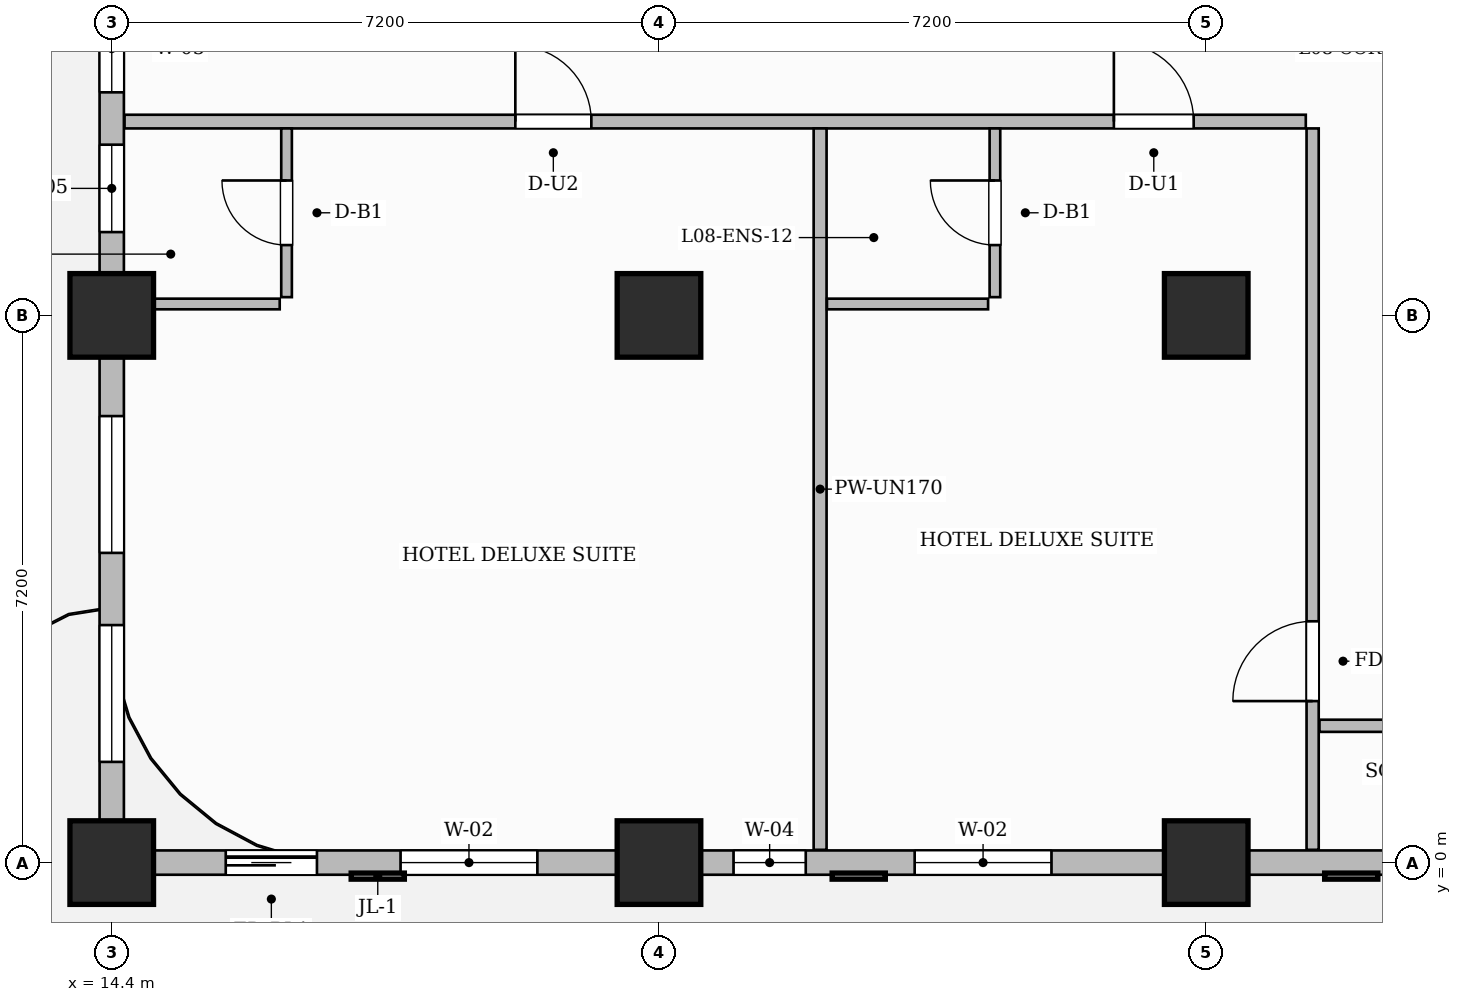
"""IFC4 building model, lengths in metres.
Left out: names, types, materials, properties, quantities, classifications, styles, units other than length and angle.
Written with IfcOpenShell. Run it as: python <this file> out.ifc"""

import sys

from ifc_helpers import new_model, si_unit, direction, frame, frame_2d, origin, origin_2d, place, context, subcontext, project, spatial, rectangle, extrude, source, transform, mapped, element, fill, save


model = new_model("IFC4")
c1 = context("Model", 3, precision=1e-05, world=origin(), true_north=direction((0.0, 1.0)))
c2 = subcontext(c1, "Body", "Model", "MODEL_VIEW")
j1 = project(units=[si_unit("LENGTHUNIT", "METRE"), si_unit("PLANEANGLEUNIT", "RADIAN")], contexts=[c1])
p1 = place(None, origin())
s1 = spatial("IfcSite", under=j1, at=p1, CompositionType="ELEMENT")
p2 = place(p1, origin())
s2 = spatial("IfcBuilding", under=s1, at=p2, CompositionType="ELEMENT")
p3 = place(p2, frame((0.0, 0.0, 39.8)))
s3 = spatial("IfcBuildingStorey", under=s2, at=p3, CompositionType="ELEMENT", Elevation=39.8)
m1 = source(origin(), c2, "Body", "SweptSolid", [
    extrude(rectangle(XDim=1.1, YDim=1.1, at=origin_2d()), origin(), (0.0, 0.0, 1.0), 3.7),
])
for number, where, z_axis, x_axis in (
    (1, (14.4, 0.0, 0.0), (0.0, 0.0, 1.0), (1.0, 0.0, 0.0)),
    (2, (14.4, 7.2, 0.0), (0.0, 0.0, 1.0), (1.0, 0.0, 0.0)),
    (3, (21.6, 0.0, 0.0), (0.0, 0.0, 1.0), (1.0, 0.0, 0.0)),
    (4, (21.6, 7.2, 0.0), (0.0, 0.0, 1.0), (1.0, 0.0, 0.0)),
    (5, (28.8, 0.0, 0.0), (0.0, 0.0, 1.0), (1.0, 0.0, 0.0)),
    (6, (28.8, 7.2, 0.0), (0.0, 0.0, 1.0), (1.0, 0.0, 0.0)),
):
    element("IfcColumn", number, at=place(p3, frame(where, z_axis=z_axis, x_axis=x_axis)), inside=s3, PredefinedType="COLUMN", context=c2, shape_type="MappedRepresentation", body=[
        mapped(m1, transform((0.0, 0.0, 0.0), scale=1.0)),
    ])
p4 = place(p3, frame((14.568, 9.75, 0.0), z_axis=(0.0, 0.0, 1.0), x_axis=(1.0, 0.0, 0.0)))
e7 = element("IfcWall", 7, at=p4, inside=s3, PredefinedType="PARTITIONING", context=c2, shape_type="SweptSolid", body=[
    extrude(rectangle(XDim=15.542, YDim=0.18, at=frame_2d((7.771, 0.0))), origin(), (0.0, 0.0, 1.0), 3.45),
])
p5 = place(p4, frame((5.142, 0.0, 0.0)))
e8 = element("IfcOpeningElement", 8, at=p5, cuts=e7, PredefinedType="OPENING", context=c2, shape_type="SweptSolid", body=[
    extrude(rectangle(XDim=1.0, YDim=2.2, at=frame_2d((0.5, 1.1))), frame((0.0, 0.1, 0.0), z_axis=(0.0, -1.0, 0.0), x_axis=(1.0, 0.0, 0.0)), (0.0, 0.0, 1.0), 0.2),
])
p6 = place(p4, frame((13.017, 0.0, 0.0)))
e9 = element("IfcOpeningElement", 9, at=p6, cuts=e7, PredefinedType="OPENING", context=c2, shape_type="SweptSolid", body=[
    extrude(rectangle(XDim=1.05, YDim=2.25, at=frame_2d((0.525, 1.125))), frame((0.0, 0.1, 0.0), z_axis=(0.0, -1.0, 0.0), x_axis=(1.0, 0.0, 0.0)), (0.0, 0.0, 1.0), 0.2),
])
p7 = place(p3, frame((30.2, 0.168, 0.0), z_axis=(0.0, 0.0, 1.0), x_axis=(0.0, 1.0, 0.0)))
e10 = element("IfcWall", 10, at=p7, inside=s3, PredefinedType="PARTITIONING", context=c2, shape_type="SweptSolid", body=[
    extrude(rectangle(XDim=9.492, YDim=0.16, at=frame_2d((4.746, 0.0))), origin(), (0.0, 0.0, 1.0), 3.45),
])
p8 = place(p7, frame((1.957, 0.0, 0.0)))
e11 = element("IfcOpeningElement", 11, at=p8, cuts=e10, PredefinedType="OPENING", context=c2, shape_type="SweptSolid", body=[
    extrude(rectangle(XDim=1.05, YDim=2.15, at=frame_2d((0.525, 1.075))), frame((0.0, 0.09, 0.0), z_axis=(0.0, -1.0, 0.0), x_axis=(1.0, 0.0, 0.0)), (0.0, 0.0, 1.0), 0.18),
])
p9 = place(p3, frame((30.29, 1.8, 0.0), z_axis=(0.0, 0.0, 1.0), x_axis=(1.0, 0.0, 0.0)))
e12 = element("IfcWall", 12, at=p9, inside=s3, PredefinedType="PARTITIONING", context=c2, shape_type="SweptSolid", body=[
    extrude(rectangle(XDim=19.37, YDim=0.16, at=frame_2d((9.685, 0.0))), origin(), (0.0, 0.0, 1.0), 3.45),
])
p10 = place(p9, frame((5.213, 0.0, 0.0)))
e13 = element("IfcOpeningElement", 13, at=p10, cuts=e12, PredefinedType="OPENING", context=c2, shape_type="SweptSolid", body=[
    extrude(rectangle(XDim=0.9, YDim=2.15, at=frame_2d((0.45, 1.075))), frame((0.0, 0.09, 0.0), z_axis=(0.0, -1.0, 0.0), x_axis=(1.0, 0.0, 0.0)), (0.0, 0.0, 1.0), 0.18),
])
p11 = place(p9, frame((14.06, 0.0, 0.0)))
e14 = element("IfcOpeningElement", 14, at=p11, cuts=e12, PredefinedType="OPENING", context=c2, shape_type="SweptSolid", body=[
    extrude(rectangle(XDim=0.9, YDim=2.15, at=frame_2d((0.45, 1.075))), frame((0.0, 0.09, 0.0), z_axis=(0.0, -1.0, 0.0), x_axis=(1.0, 0.0, 0.0)), (0.0, 0.0, 1.0), 0.18),
])
p12 = place(p3, frame((23.72, 0.168, 0.0), z_axis=(0.0, 0.0, 1.0), x_axis=(0.0, 1.0, 0.0)))
e15 = element("IfcWall", 15, at=p12, inside=s3, PredefinedType="PARTITIONING", context=c2, shape_type="SweptSolid", body=[
    extrude(rectangle(XDim=9.492, YDim=0.17, at=frame_2d((4.746, 0.0))), origin(), (0.0, 0.0, 1.0), 3.45),
])
p13 = place(p3, frame((16.7, 7.44, 0.0), z_axis=(0.0, 0.0, 1.0), x_axis=(0.0, 1.0, 0.0)))
e16 = element("IfcWall", 16, at=p13, inside=s3, PredefinedType="PARTITIONING", context=c2, shape_type="SweptSolid", body=[
    extrude(rectangle(XDim=2.22, YDim=0.14, at=frame_2d((1.11, 0.0))), origin(), (0.0, 0.0, 1.0), 3.45),
])
p14 = place(p13, frame((0.685, 0.0, 0.0)))
e17 = element("IfcOpeningElement", 17, at=p14, cuts=e16, PredefinedType="OPENING", context=c2, shape_type="SweptSolid", body=[
    extrude(rectangle(XDim=0.85, YDim=2.1, at=frame_2d((0.425, 1.05))), frame((0.0, 0.08, 0.0), z_axis=(0.0, -1.0, 0.0), x_axis=(1.0, 0.0, 0.0)), (0.0, 0.0, 1.0), 0.16),
])
p15 = place(p3, frame((14.49, 7.35, 0.0), z_axis=(0.0, 0.0, 1.0), x_axis=(1.0, 0.0, 0.0)))
e18 = element("IfcWall", 18, at=p15, inside=s3, PredefinedType="PARTITIONING", context=c2, shape_type="SweptSolid", body=[
    extrude(rectangle(XDim=2.12, YDim=0.14, at=frame_2d((1.06, 0.0))), origin(), (0.0, 0.0, 1.0), 2.885),
])
p16 = place(p3, frame((26.02, 7.44, 0.0), z_axis=(0.0, 0.0, 1.0), x_axis=(0.0, 1.0, 0.0)))
e19 = element("IfcWall", 19, at=p16, inside=s3, PredefinedType="PARTITIONING", context=c2, shape_type="SweptSolid", body=[
    extrude(rectangle(XDim=2.22, YDim=0.14, at=frame_2d((1.11, 0.0))), origin(), (0.0, 0.0, 1.0), 3.45),
])
p17 = place(p16, frame((0.685, 0.0, 0.0)))
e20 = element("IfcOpeningElement", 20, at=p17, cuts=e19, PredefinedType="OPENING", context=c2, shape_type="SweptSolid", body=[
    extrude(rectangle(XDim=0.85, YDim=2.1, at=frame_2d((0.425, 1.05))), frame((0.0, 0.08, 0.0), z_axis=(0.0, -1.0, 0.0), x_axis=(1.0, 0.0, 0.0)), (0.0, 0.0, 1.0), 0.16),
])
p18 = place(p3, frame((23.81, 7.35, 0.0), z_axis=(0.0, 0.0, 1.0), x_axis=(1.0, 0.0, 0.0)))
e21 = element("IfcWall", 21, at=p18, inside=s3, PredefinedType="PARTITIONING", context=c2, shape_type="SweptSolid", body=[
    extrude(rectangle(XDim=2.12, YDim=0.14, at=frame_2d((1.06, 0.0))), origin(), (0.0, 0.0, 1.0), 2.885),
])
p19 = place(p3, frame((14.4, 0.0, 0.0), z_axis=(0.0, 0.0, 1.0), x_axis=(1.0, 0.0, 0.0)))
e22 = element("IfcWall", 22, at=p19, inside=s3, PredefinedType="SOLIDWALL", context=c2, shape_type="SweptSolid", body=[
    extrude(rectangle(XDim=43.2, YDim=0.32, at=frame_2d((21.6, 0.0))), origin(), (0.0, 0.0, 1.0), 2.885),
])
p20 = place(p19, frame((1.5, 0.0, 0.0)))
e23 = element("IfcOpeningElement", 23, at=p20, cuts=e22, PredefinedType="OPENING", context=c2, shape_type="SweptSolid", body=[
    extrude(rectangle(XDim=1.2, YDim=2.2, at=frame_2d((0.6, 1.1))), frame((0.0, 0.17, 0.0), z_axis=(0.0, -1.0, 0.0), x_axis=(1.0, 0.0, 0.0)), (0.0, 0.0, 1.0), 0.34),
])
p21 = place(p19, frame((3.8, 0.0, 0.8)))
e24 = element("IfcOpeningElement", 24, at=p21, cuts=e22, PredefinedType="OPENING", context=c2, shape_type="SweptSolid", body=[
    extrude(rectangle(XDim=1.8, YDim=1.85, at=frame_2d((0.9, 0.925))), frame((0.0, 0.17, 0.0), z_axis=(0.0, -1.0, 0.0), x_axis=(1.0, 0.0, 0.0)), (0.0, 0.0, 1.0), 0.34),
])
p22 = place(p19, frame((8.181, 0.0, 0.8)))
e25 = element("IfcOpeningElement", 25, at=p22, cuts=e22, PredefinedType="OPENING", context=c2, shape_type="SweptSolid", body=[
    extrude(rectangle(XDim=0.95, YDim=1.75, at=frame_2d((0.475, 0.875))), frame((0.0, 0.17, 0.0), z_axis=(0.0, -1.0, 0.0), x_axis=(1.0, 0.0, 0.0)), (0.0, 0.0, 1.0), 0.34),
])
p23 = place(p19, frame((10.564, 0.0, 0.8)))
e26 = element("IfcOpeningElement", 26, at=p23, cuts=e22, PredefinedType="OPENING", context=c2, shape_type="SweptSolid", body=[
    extrude(rectangle(XDim=1.8, YDim=1.85, at=frame_2d((0.9, 0.925))), frame((0.0, 0.17, 0.0), z_axis=(0.0, -1.0, 0.0), x_axis=(1.0, 0.0, 0.0)), (0.0, 0.0, 1.0), 0.34),
])
p24 = place(p19, frame((16.804, 0.0, 0.8)))
e27 = element("IfcOpeningElement", 27, at=p24, cuts=e22, PredefinedType="OPENING", context=c2, shape_type="SweptSolid", body=[
    extrude(rectangle(XDim=1.8, YDim=1.85, at=frame_2d((0.9, 0.925))), frame((0.0, 0.17, 0.0), z_axis=(0.0, -1.0, 0.0), x_axis=(1.0, 0.0, 0.0)), (0.0, 0.0, 1.0), 0.34),
])
p25 = place(p19, frame((22.396, 0.0, 0.8)))
e28 = element("IfcOpeningElement", 28, at=p25, cuts=e22, PredefinedType="OPENING", context=c2, shape_type="SweptSolid", body=[
    extrude(rectangle(XDim=1.8, YDim=1.85, at=frame_2d((0.9, 0.925))), frame((0.0, 0.17, 0.0), z_axis=(0.0, -1.0, 0.0), x_axis=(1.0, 0.0, 0.0)), (0.0, 0.0, 1.0), 0.34),
])
p26 = place(p19, frame((25.629, 0.0, 0.8)))
e29 = element("IfcOpeningElement", 29, at=p26, cuts=e22, PredefinedType="OPENING", context=c2, shape_type="SweptSolid", body=[
    extrude(rectangle(XDim=0.95, YDim=1.75, at=frame_2d((0.475, 0.875))), frame((0.0, 0.17, 0.0), z_axis=(0.0, -1.0, 0.0), x_axis=(1.0, 0.0, 0.0)), (0.0, 0.0, 1.0), 0.34),
])
p27 = place(p19, frame((29.075, 0.0, 0.8)))
e30 = element("IfcOpeningElement", 30, at=p27, cuts=e22, PredefinedType="OPENING", context=c2, shape_type="SweptSolid", body=[
    extrude(rectangle(XDim=1.8, YDim=1.85, at=frame_2d((0.9, 0.925))), frame((0.0, 0.17, 0.0), z_axis=(0.0, -1.0, 0.0), x_axis=(1.0, 0.0, 0.0)), (0.0, 0.0, 1.0), 0.34),
])
p28 = place(p19, frame((32.125, 0.0, 0.8)))
e31 = element("IfcOpeningElement", 31, at=p28, cuts=e22, PredefinedType="OPENING", context=c2, shape_type="SweptSolid", body=[
    extrude(rectangle(XDim=1.8, YDim=1.85, at=frame_2d((0.9, 0.925))), frame((0.0, 0.17, 0.0), z_axis=(0.0, -1.0, 0.0), x_axis=(1.0, 0.0, 0.0)), (0.0, 0.0, 1.0), 0.34),
])
p29 = place(p19, frame((36.946, 0.0, 0.8)))
e32 = element("IfcOpeningElement", 32, at=p29, cuts=e22, PredefinedType="OPENING", context=c2, shape_type="SweptSolid", body=[
    extrude(rectangle(XDim=1.8, YDim=1.85, at=frame_2d((0.9, 0.925))), frame((0.0, 0.17, 0.0), z_axis=(0.0, -1.0, 0.0), x_axis=(1.0, 0.0, 0.0)), (0.0, 0.0, 1.0), 0.34),
])
p30 = place(p19, frame((40.054, 0.0, 0.8)))
e33 = element("IfcOpeningElement", 33, at=p30, cuts=e22, PredefinedType="OPENING", context=c2, shape_type="SweptSolid", body=[
    extrude(rectangle(XDim=1.8, YDim=1.85, at=frame_2d((0.9, 0.925))), frame((0.0, 0.17, 0.0), z_axis=(0.0, -1.0, 0.0), x_axis=(1.0, 0.0, 0.0)), (0.0, 0.0, 1.0), 0.34),
])
p31 = place(p3, frame((14.4, 0.05, 0.0), z_axis=(0.0, 0.0, 1.0), x_axis=(0.0, 1.0, 0.0)))
e34 = element("IfcWall", 34, at=p31, inside=s3, PredefinedType="SOLIDWALL", context=c2, shape_type="SweptSolid", body=[
    extrude(rectangle(XDim=21.5, YDim=0.32, at=frame_2d((10.75, 0.0))), origin(), (0.0, 0.0, 1.0), 2.885),
])
p32 = place(p31, frame((1.275, 0.0, 0.8)))
e35 = element("IfcOpeningElement", 35, at=p32, cuts=e34, PredefinedType="OPENING", context=c2, shape_type="SweptSolid", body=[
    extrude(rectangle(XDim=1.8, YDim=1.85, at=frame_2d((0.9, 0.925))), frame((0.0, 0.17, 0.0), z_axis=(0.0, -1.0, 0.0), x_axis=(1.0, 0.0, 0.0)), (0.0, 0.0, 1.0), 0.34),
])
p33 = place(p31, frame((4.025, 0.0, 0.8)))
e36 = element("IfcOpeningElement", 36, at=p33, cuts=e34, PredefinedType="OPENING", context=c2, shape_type="SweptSolid", body=[
    extrude(rectangle(XDim=1.8, YDim=1.85, at=frame_2d((0.9, 0.925))), frame((0.0, 0.17, 0.0), z_axis=(0.0, -1.0, 0.0), x_axis=(1.0, 0.0, 0.0)), (0.0, 0.0, 1.0), 0.34),
])
p34 = place(p31, frame((8.246, 0.0, 0.8)))
e37 = element("IfcOpeningElement", 37, at=p34, cuts=e34, PredefinedType="OPENING", context=c2, shape_type="SweptSolid", body=[
    extrude(rectangle(XDim=1.15, YDim=1.8, at=frame_2d((0.575, 0.9))), frame((0.0, 0.17, 0.0), z_axis=(0.0, -1.0, 0.0), x_axis=(1.0, 0.0, 0.0)), (0.0, 0.0, 1.0), 0.34),
])
p35 = place(p31, frame((10.085, 0.0, 0.8)))
e38 = element("IfcOpeningElement", 38, at=p35, cuts=e34, PredefinedType="OPENING", context=c2, shape_type="SweptSolid", body=[
    extrude(rectangle(XDim=1.15, YDim=1.8, at=frame_2d((0.575, 0.9))), frame((0.0, 0.17, 0.0), z_axis=(0.0, -1.0, 0.0), x_axis=(1.0, 0.0, 0.0)), (0.0, 0.0, 1.0), 0.34),
])
p36 = place(p31, frame((12.014, 0.0, 0.8)))
e39 = element("IfcOpeningElement", 39, at=p36, cuts=e34, PredefinedType="OPENING", context=c2, shape_type="SweptSolid", body=[
    extrude(rectangle(XDim=1.15, YDim=1.8, at=frame_2d((0.575, 0.9))), frame((0.0, 0.17, 0.0), z_axis=(0.0, -1.0, 0.0), x_axis=(1.0, 0.0, 0.0)), (0.0, 0.0, 1.0), 0.34),
])
p37 = place(p31, frame((15.406, 0.0, 0.8)))
e40 = element("IfcOpeningElement", 40, at=p37, cuts=e34, PredefinedType="OPENING", context=c2, shape_type="SweptSolid", body=[
    extrude(rectangle(XDim=0.95, YDim=1.75, at=frame_2d((0.475, 0.875))), frame((0.0, 0.17, 0.0), z_axis=(0.0, -1.0, 0.0), x_axis=(1.0, 0.0, 0.0)), (0.0, 0.0, 1.0), 0.34),
])
p38 = place(p31, frame((17.789, 0.0, 0.8)))
e41 = element("IfcOpeningElement", 41, at=p38, cuts=e34, PredefinedType="OPENING", context=c2, shape_type="SweptSolid", body=[
    extrude(rectangle(XDim=1.8, YDim=1.85, at=frame_2d((0.9, 0.925))), frame((0.0, 0.17, 0.0), z_axis=(0.0, -1.0, 0.0), x_axis=(1.0, 0.0, 0.0)), (0.0, 0.0, 1.0), 0.34),
])
m2 = source(origin(), c2, "Body", "SweptSolid", [
    extrude(rectangle(XDim=1.05, YDim=2.15, at=frame_2d((0.525, 1.075))), frame((0.0, 0.025, 0.0), z_axis=(0.0, -1.0, 0.0), x_axis=(1.0, 0.0, 0.0)), (0.0, 0.0, 1.0), 0.05),
])
p39 = place(p8, origin())
e42 = element("IfcDoor", 42, at=p39, inside=s3, OperationType="SINGLE_SWING_LEFT", PredefinedType="DOOR", context=c2, shape_type="MappedRepresentation", body=[
    mapped(m2, transform((0.0, 0.0, 0.0), scale=1.0)),
])
fill(e11, e42)
m3 = source(origin(), c2, "Body", "SweptSolid", [
    extrude(rectangle(XDim=0.85, YDim=2.1, at=frame_2d((0.425, 1.05))), frame((0.0, 0.025, 0.0), z_axis=(0.0, -1.0, 0.0), x_axis=(1.0, 0.0, 0.0)), (0.0, 0.0, 1.0), 0.05),
])
p40 = place(p14, origin())
e43 = element("IfcDoor", 43, at=p40, inside=s3, OperationType="SINGLE_SWING_RIGHT", PredefinedType="DOOR", context=c2, shape_type="MappedRepresentation", body=[
    mapped(m3, transform((0.0, 0.0, 0.0), scale=1.0)),
])
fill(e17, e43)
m4 = source(origin(), c2, "Body", "SweptSolid", [
    extrude(rectangle(XDim=1.0, YDim=2.2, at=frame_2d((0.5, 1.1))), frame((0.0, 0.025, 0.0), z_axis=(0.0, -1.0, 0.0), x_axis=(1.0, 0.0, 0.0)), (0.0, 0.0, 1.0), 0.05),
])
p41 = place(p5, origin())
e44 = element("IfcDoor", 44, at=p41, inside=s3, OperationType="SINGLE_SWING_LEFT", PredefinedType="DOOR", context=c2, shape_type="MappedRepresentation", body=[
    mapped(m4, transform((0.0, 0.0, 0.0), scale=1.0)),
])
fill(e8, e44)
p42 = place(p17, origin())
e45 = element("IfcDoor", 45, at=p42, inside=s3, OperationType="SINGLE_SWING_RIGHT", PredefinedType="DOOR", context=c2, shape_type="MappedRepresentation", body=[
    mapped(m3, transform((0.0, 0.0, 0.0), scale=1.0)),
])
fill(e20, e45)
m5 = source(origin(), c2, "Body", "SweptSolid", [
    extrude(rectangle(XDim=1.05, YDim=2.25, at=frame_2d((0.525, 1.125))), frame((0.0, 0.025, 0.0), z_axis=(0.0, -1.0, 0.0), x_axis=(1.0, 0.0, 0.0)), (0.0, 0.0, 1.0), 0.05),
])
p43 = place(p6, origin())
e46 = element("IfcDoor", 46, at=p43, inside=s3, OperationType="SINGLE_SWING_LEFT", PredefinedType="DOOR", context=c2, shape_type="MappedRepresentation", body=[
    mapped(m5, transform((0.0, 0.0, 0.0), scale=1.0)),
])
fill(e9, e46)
m6 = source(origin(), c2, "Body", "SweptSolid", [
    extrude(rectangle(XDim=1.2, YDim=2.2, at=frame_2d((0.6, 1.1))), frame((0.0, 0.025, 0.0), z_axis=(0.0, -1.0, 0.0), x_axis=(1.0, 0.0, 0.0)), (0.0, 0.0, 1.0), 0.05),
])
p44 = place(p20, origin())
e47 = element("IfcDoor", 47, at=p44, inside=s3, OperationType="SLIDING_TO_LEFT", PredefinedType="DOOR", context=c2, shape_type="MappedRepresentation", body=[
    mapped(m6, transform((0.0, 0.0, 0.0), scale=1.0)),
])
fill(e23, e47)
m7 = source(origin(), c2, "Body", "SweptSolid", [
    extrude(rectangle(XDim=1.8, YDim=1.85, at=frame_2d((0.9, 0.925))), frame((0.0, 0.03, 0.0), z_axis=(0.0, -1.0, 0.0), x_axis=(1.0, 0.0, 0.0)), (0.0, 0.0, 1.0), 0.06),
])
p45 = place(p21, origin())
e48 = element("IfcWindow", 48, at=p45, inside=s3, PartitioningType="DOUBLE_PANEL_VERTICAL", PredefinedType="WINDOW", context=c2, shape_type="MappedRepresentation", body=[
    mapped(m7, transform((0.0, 0.0, 0.0), scale=1.0)),
])
fill(e24, e48)
m8 = source(origin(), c2, "Body", "SweptSolid", [
    extrude(rectangle(XDim=0.95, YDim=1.75, at=frame_2d((0.475, 0.875))), frame((0.0, 0.03, 0.0), z_axis=(0.0, -1.0, 0.0), x_axis=(1.0, 0.0, 0.0)), (0.0, 0.0, 1.0), 0.06),
])
p46 = place(p22, origin())
e49 = element("IfcWindow", 49, at=p46, inside=s3, PartitioningType="SINGLE_PANEL", PredefinedType="WINDOW", context=c2, shape_type="MappedRepresentation", body=[
    mapped(m8, transform((0.0, 0.0, 0.0), scale=1.0)),
])
fill(e25, e49)
p47 = place(p23, origin())
e50 = element("IfcWindow", 50, at=p47, inside=s3, PartitioningType="DOUBLE_PANEL_VERTICAL", PredefinedType="WINDOW", context=c2, shape_type="MappedRepresentation", body=[
    mapped(m7, transform((0.0, 0.0, 0.0), scale=1.0)),
])
fill(e26, e50)
p48 = place(p32, origin())
e51 = element("IfcWindow", 51, at=p48, inside=s3, PartitioningType="DOUBLE_PANEL_VERTICAL", PredefinedType="WINDOW", context=c2, shape_type="MappedRepresentation", body=[
    mapped(m7, transform((0.0, 0.0, 0.0), scale=1.0)),
])
fill(e35, e51)
p49 = place(p33, origin())
e52 = element("IfcWindow", 52, at=p49, inside=s3, PartitioningType="DOUBLE_PANEL_VERTICAL", PredefinedType="WINDOW", context=c2, shape_type="MappedRepresentation", body=[
    mapped(m7, transform((0.0, 0.0, 0.0), scale=1.0)),
])
fill(e36, e52)
m9 = source(origin(), c2, "Body", "SweptSolid", [
    extrude(rectangle(XDim=1.15, YDim=1.8, at=frame_2d((0.575, 0.9))), frame((0.0, 0.03, 0.0), z_axis=(0.0, -1.0, 0.0), x_axis=(1.0, 0.0, 0.0)), (0.0, 0.0, 1.0), 0.06),
])
p50 = place(p34, origin())
e53 = element("IfcWindow", 53, at=p50, inside=s3, PartitioningType="SINGLE_PANEL", PredefinedType="WINDOW", context=c2, shape_type="MappedRepresentation", body=[
    mapped(m9, transform((0.0, 0.0, 0.0), scale=1.0)),
])
fill(e37, e53)
p51 = place(p35, origin())
e54 = element("IfcWindow", 54, at=p51, inside=s3, PartitioningType="SINGLE_PANEL", PredefinedType="WINDOW", context=c2, shape_type="MappedRepresentation", body=[
    mapped(m9, transform((0.0, 0.0, 0.0), scale=1.0)),
])
fill(e38, e54)
save(model, sys.argv[1])
